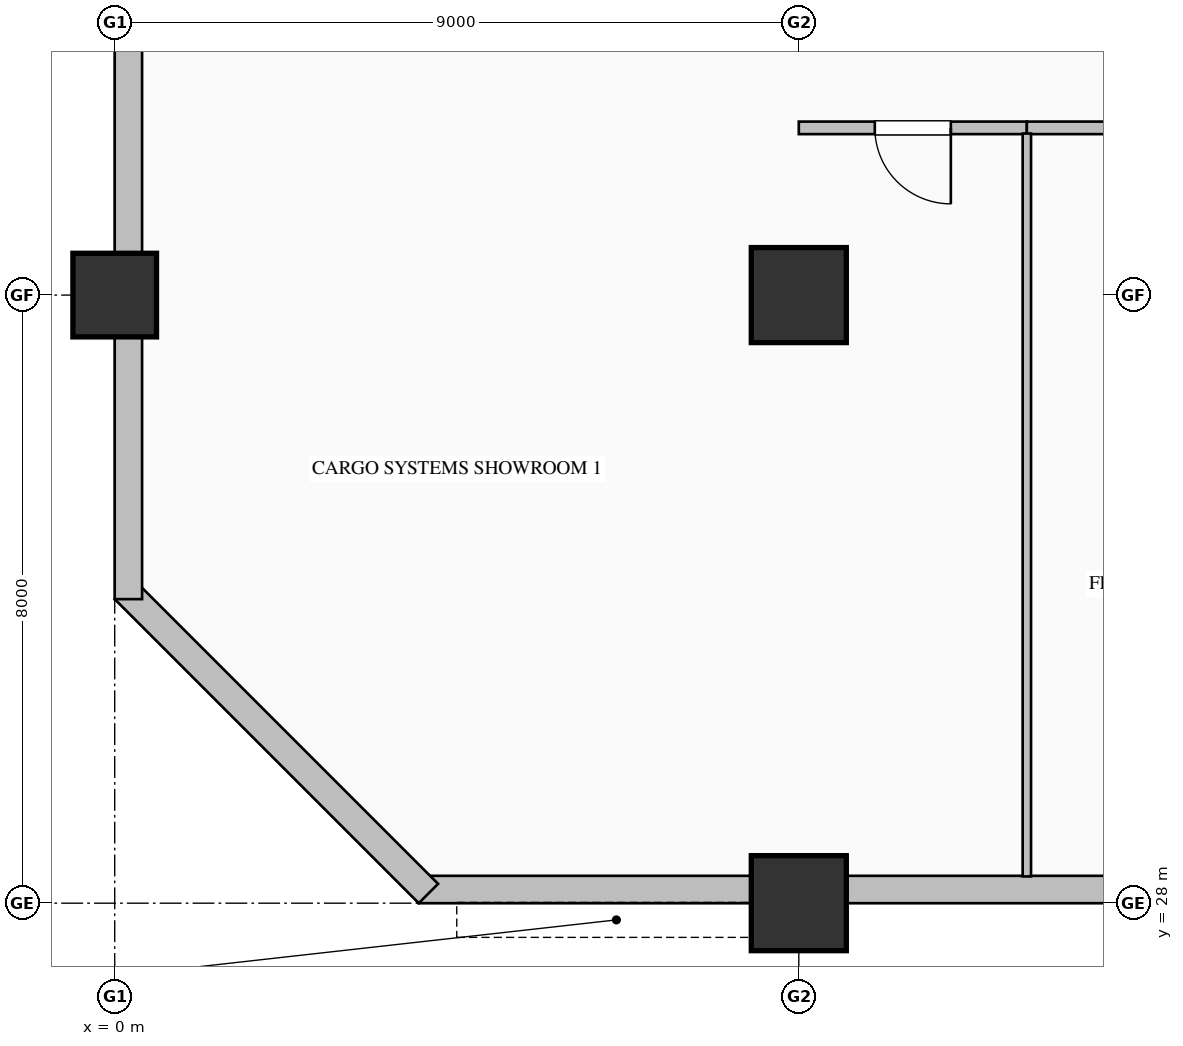
"""IFC4 building model, lengths in metres.
Left out: names, types, materials, properties, quantities, classifications, styles, units other than length and angle.
Written with IfcOpenShell. Run it as: python <this file> out.ifc"""

import sys

from ifc_helpers import new_model, si_unit, direction, frame, frame_2d, origin, origin_2d, place, context, subcontext, project, spatial, rectangle, hollow_rectangle, extrude, element, fill, save


model = new_model("IFC4")
c1 = context("Model", 3, precision=1e-05, world=origin(), true_north=direction((0.0, 1.0)))
c2 = subcontext(c1, "Body", "Model", "MODEL_VIEW")
j1 = project(units=[si_unit("LENGTHUNIT", "METRE"), si_unit("PLANEANGLEUNIT", "RADIAN")], contexts=[c1])
p1 = place(None, origin())
s1 = spatial("IfcSite", under=j1, at=p1, CompositionType="ELEMENT")
p2 = place(p1, origin())
s2 = spatial("IfcBuilding", under=s1, at=p2, CompositionType="ELEMENT")
p3 = place(p2, frame((0.0, 0.0, 96.2)))
s3 = spatial("IfcBuildingStorey", under=s2, at=p3, CompositionType="ELEMENT", Elevation=96.2)
p4 = place(p3, frame((0.0, 36.0, 0.0), z_axis=(0.0, 0.0, 1.0), x_axis=(1.0, 0.0, 0.0)))
e1 = element("IfcColumn", 1, at=p4, inside=s3, PredefinedType="COLUMN", context=c2, shape_type="SweptSolid", body=[
    extrude(hollow_rectangle(XDim=1.1, YDim=1.1, WallThickness=0.04, at=origin_2d()), origin(), (0.0, 0.0, 1.0), 4.0),
])
for number, where, z_axis, x_axis in (
    (2, (9.0, 28.0, 0.0), (0.0, 0.0, 1.0), (1.0, 0.0, 0.0)),
    (3, (9.0, 36.0, 0.0), (0.0, 0.0, 1.0), (1.0, 0.0, 0.0)),
):
    element("IfcColumn", number, at=place(p3, frame(where, z_axis=z_axis, x_axis=x_axis)), inside=s3, PredefinedType="COLUMN", context=c2, shape_type="SweptSolid", body=[
        extrude(hollow_rectangle(XDim=1.25, YDim=1.25, WallThickness=0.045, at=origin_2d()), origin(), (0.0, 0.0, 1.0), 4.0),
    ])
p5 = place(p3, frame((40.52, 28.18, 0.0), z_axis=(0.0, 0.0, 1.0), x_axis=(-1.0, 0.0, 0.0)))
e4 = element("IfcWall", 4, at=p5, inside=s3, PredefinedType="SOLIDWALL", context=c2, shape_type="SweptSolid", body=[
    extrude(rectangle(XDim=36.52, YDim=0.36, at=frame_2d((18.26, 0.0))), origin(), (0.0, 0.0, 1.0), 3.05),
])
p6 = place(p5, frame((13.8, 0.0, 0.7)))
e5 = element("IfcOpeningElement", 5, at=p6, cuts=e4, PredefinedType="OPENING", context=c2, shape_type="SweptSolid", body=[
    extrude(rectangle(XDim=1.2, YDim=1.85, at=frame_2d((0.6, 0.925))), frame((0.0, 0.19, 0.0), z_axis=(0.0, -1.0, 0.0), x_axis=(1.0, 0.0, 0.0)), (0.0, 0.0, 1.0), 0.38),
])
p7 = place(p5, frame((21.0, 0.0, 0.7)))
e6 = element("IfcOpeningElement", 6, at=p7, cuts=e4, PredefinedType="OPENING", context=c2, shape_type="SweptSolid", body=[
    extrude(rectangle(XDim=1.2, YDim=1.85, at=frame_2d((0.6, 0.925))), frame((0.0, 0.19, 0.0), z_axis=(0.0, -1.0, 0.0), x_axis=(1.0, 0.0, 0.0)), (0.0, 0.0, 1.0), 0.38),
])
p8 = place(p3, frame((4.127, 28.127, 0.0), z_axis=(0.0, 0.0, 1.0), x_axis=(-0.707106781187, 0.707106781187, 0.0)))
e7 = element("IfcWall", 7, at=p8, inside=s3, PredefinedType="SOLIDWALL", context=c2, shape_type="SweptSolid", body=[
    extrude(rectangle(XDim=5.657, YDim=0.36, at=frame_2d((2.828, 0.0))), origin(), (0.0, 0.0, 1.0), 3.75),
])
p9 = place(p3, frame((0.18, 32.0, 0.0), z_axis=(0.0, 0.0, 1.0), x_axis=(0.0, 1.0, 0.0)))
e8 = element("IfcWall", 8, at=p9, inside=s3, PredefinedType="SOLIDWALL", context=c2, shape_type="SweptSolid", body=[
    extrude(rectangle(XDim=16.0, YDim=0.36, at=frame_2d((8.0, 0.0))), origin(), (0.0, 0.0, 1.0), 3.25),
])
p10 = place(p3, frame((12.0, 38.2, 0.0), z_axis=(0.0, 0.0, 1.0), x_axis=(-1.0, 0.0, 0.0)))
e9 = element("IfcWall", 9, at=p10, inside=s3, PredefinedType="PARTITIONING", context=c2, shape_type="SweptSolid", body=[
    extrude(rectangle(XDim=3.0, YDim=0.165, at=frame_2d((1.5, 0.0))), origin(), (0.0, 0.0, 1.0), 3.75),
])
p11 = place(p10, frame((1.0, 0.0, 0.0)))
e10 = element("IfcOpeningElement", 10, at=p11, cuts=e9, PredefinedType="OPENING", context=c2, shape_type="SweptSolid", body=[
    extrude(rectangle(XDim=1.0, YDim=2.15, at=frame_2d((0.5, 1.075))), frame((0.0, 0.093, 0.0), z_axis=(0.0, -1.0, 0.0), x_axis=(1.0, 0.0, 0.0)), (0.0, 0.0, 1.0), 0.185),
])
p12 = place(p3, frame((17.5, 38.2, 0.0), z_axis=(0.0, 0.0, 1.0), x_axis=(-1.0, 0.0, 0.0)))
e11 = element("IfcWall", 11, at=p12, inside=s3, PredefinedType="PARTITIONING", context=c2, shape_type="SweptSolid", body=[
    extrude(rectangle(XDim=5.5, YDim=0.165, at=frame_2d((2.75, 0.0))), origin(), (0.0, 0.0, 1.0), 3.75),
])
p13 = place(p12, frame((2.25, 0.0, 0.0)))
e12 = element("IfcOpeningElement", 12, at=p13, cuts=e11, PredefinedType="OPENING", context=c2, shape_type="SweptSolid", body=[
    extrude(rectangle(XDim=1.0, YDim=2.15, at=frame_2d((0.5, 1.075))), frame((0.0, 0.093, 0.0), z_axis=(0.0, -1.0, 0.0), x_axis=(1.0, 0.0, 0.0)), (0.0, 0.0, 1.0), 0.185),
])
p14 = place(p3, frame((12.0, 38.125, 0.0), z_axis=(0.0, 0.0, 1.0), x_axis=(0.0, -1.0, 0.0)))
e13 = element("IfcWall", 13, at=p14, inside=s3, PredefinedType="MOVABLE", context=c2, shape_type="SweptSolid", body=[
    extrude(rectangle(XDim=9.773, YDim=0.11, at=frame_2d((4.887, 0.0))), origin(), (0.0, 0.0, 1.0), 3.75),
])
p15 = place(p11, origin())
e14 = element("IfcDoor", 14, at=p15, inside=s3, OperationType="SINGLE_SWING_LEFT", PredefinedType="DOOR", context=c2, shape_type="SweptSolid", body=[
    extrude(rectangle(XDim=1.0, YDim=2.15, at=frame_2d((0.5, 1.075))), frame((0.0, 0.025, 0.0), z_axis=(0.0, -1.0, 0.0), x_axis=(1.0, 0.0, 0.0)), (0.0, 0.0, 1.0), 0.05),
])
fill(e10, e14)
save(model, sys.argv[1])
